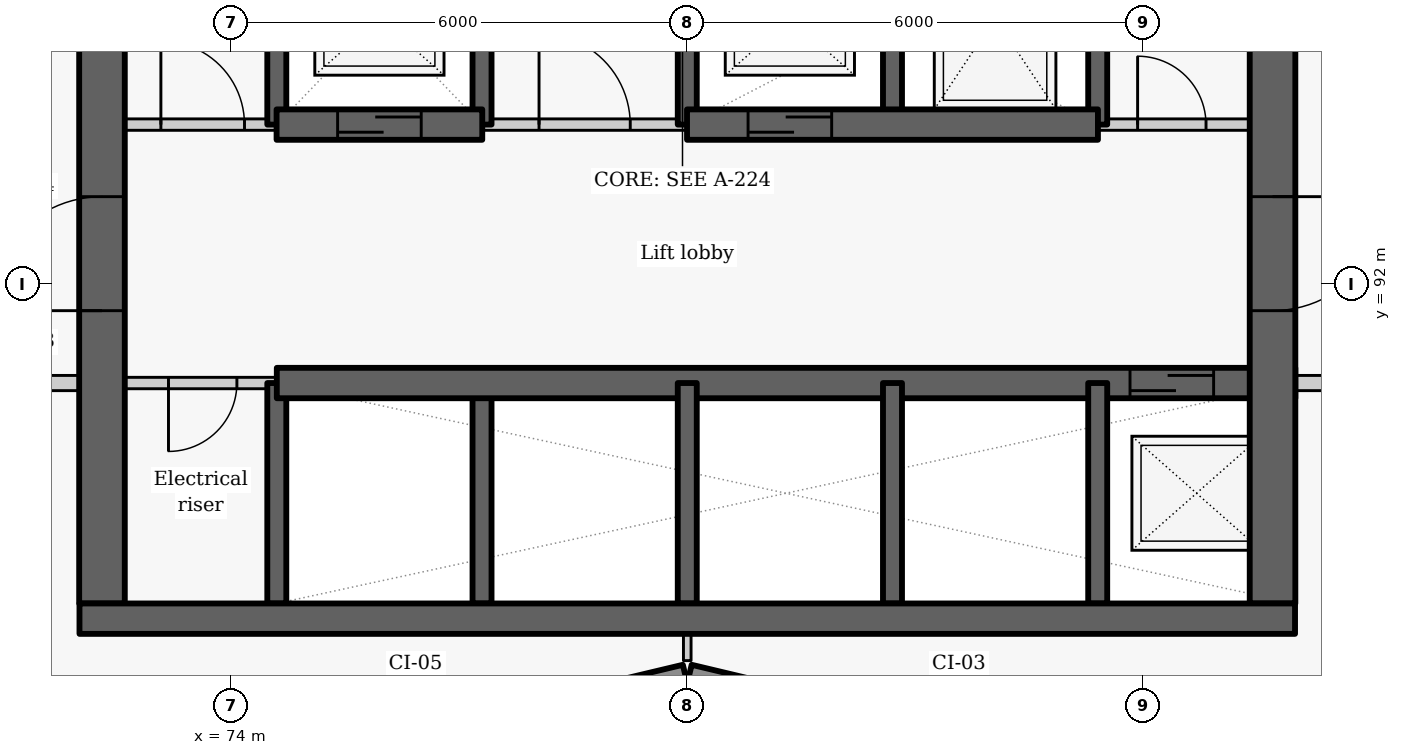
"""IFC4 building model, lengths in metres.
Left out: names, types, materials, properties, quantities, classifications, styles, units other than length and angle.
Written with IfcOpenShell. Run it as: python <this file> out.ifc"""

import sys

from ifc_helpers import new_model, si_unit, direction, frame, frame_2d, origin, place, context, subcontext, project, spatial, rectangle, extrude, element, fill, save


model = new_model("IFC4")
c1 = context("Model", 3, precision=1e-05, world=origin(), true_north=direction((0.0, 1.0)))
c2 = subcontext(c1, "Body", "Model", "MODEL_VIEW")
j1 = project(units=[si_unit("LENGTHUNIT", "METRE"), si_unit("PLANEANGLEUNIT", "RADIAN")], contexts=[c1])
p1 = place(None, origin())
s1 = spatial("IfcSite", under=j1, at=p1, CompositionType="ELEMENT")
p2 = place(p1, origin())
s2 = spatial("IfcBuilding", under=s1, at=p2, CompositionType="ELEMENT")
p3 = place(p2, frame((0.0, 0.0, 127.2)))
s3 = spatial("IfcBuildingStorey", under=s2, at=p3, CompositionType="ELEMENT", Elevation=127.2)
p4 = place(p3, frame((76.814, 86.119, 0.0), z_axis=(0.0, 0.0, 1.0), x_axis=(0.972773113459, 0.231759508395, 0.0)))
e1 = element("IfcWall", 1, at=p4, inside=s3, PredefinedType="SOLIDWALL", context=c2, shape_type="SweptSolid", body=[
    extrude(rectangle(XDim=3.246, YDim=0.25, at=frame_2d((1.623, 0.0))), origin(), (0.0, 0.0, 1.0), 2.425),
])
p5 = place(p4, frame((0.573, 0.0, 0.9)))
e2 = element("IfcOpeningElement", 2, at=p5, cuts=e1, PredefinedType="OPENING", context=c2, shape_type="SweptSolid", body=[
    extrude(rectangle(XDim=2.1, YDim=1.1, at=frame_2d((1.05, 0.55))), frame((0.0, 0.135, 0.0), z_axis=(0.0, -1.0, 0.0), x_axis=(1.0, 0.0, 0.0)), (0.0, 0.0, 1.0), 0.27),
])
p6 = place(p3, frame((80.029, 86.872, 0.0), z_axis=(0.0, 0.0, 1.0), x_axis=(0.972773113459, -0.231759508395, 0.0)))
e3 = element("IfcWall", 3, at=p6, inside=s3, PredefinedType="SOLIDWALL", context=c2, shape_type="SweptSolid", body=[
    extrude(rectangle(XDim=3.246, YDim=0.25, at=frame_2d((1.623, 0.0))), origin(), (0.0, 0.0, 1.0), 2.425),
])
p7 = place(p6, frame((0.573, 0.0, 0.9)))
e4 = element("IfcOpeningElement", 4, at=p7, cuts=e3, PredefinedType="OPENING", context=c2, shape_type="SweptSolid", body=[
    extrude(rectangle(XDim=2.1, YDim=1.1, at=frame_2d((1.05, 0.55))), frame((0.0, 0.135, 0.0), z_axis=(0.0, -1.0, 0.0), x_axis=(1.0, 0.0, 0.0)), (0.0, 0.0, 1.0), 0.27),
])
p8 = place(p3, frame((74.6, 87.8, -0.41), z_axis=(0.0, 0.0, 1.0), x_axis=(0.0, 1.0, 0.0)))
e5 = element("IfcWall", 5, at=p8, inside=s3, PredefinedType="SHEAR", context=c2, shape_type="SweptSolid", body=[
    extrude(rectangle(XDim=2.9, YDim=0.25, at=frame_2d((1.45, 0.0))), origin(), (0.0, 0.0, 1.0), 3.435),
])
p9 = place(p3, frame((74.6, 94.1, -0.41), z_axis=(0.0, 0.0, 1.0), x_axis=(0.0, 1.0, 0.0)))
e6 = element("IfcWall", 6, at=p9, inside=s3, PredefinedType="SHEAR", context=c2, shape_type="SweptSolid", body=[
    extrude(rectangle(XDim=2.8, YDim=0.25, at=frame_2d((1.4, 0.0))), origin(), (0.0, 0.0, 1.0), 3.435),
])
p10 = place(p3, frame((74.6, 90.7, 0.0), z_axis=(0.0, 0.0, 1.0), x_axis=(-1.0, 0.0, 0.0)))
e7 = element("IfcWall", 7, at=p10, inside=s3, PredefinedType="PARTITIONING", context=c2, shape_type="SweptSolid", body=[
    extrude(rectangle(XDim=2.6, YDim=0.15, at=frame_2d((1.3, 0.0))), origin(), (0.0, 0.0, 1.0), 3.025),
])
p11 = place(p10, frame((0.525, 0.0, 0.0)))
e8 = element("IfcOpeningElement", 8, at=p11, cuts=e7, PredefinedType="OPENING", context=c2, shape_type="SweptSolid", body=[
    extrude(rectangle(XDim=0.9, YDim=2.1, at=frame_2d((0.45, 1.05))), frame((0.0, 0.085, 0.0), z_axis=(0.0, -1.0, 0.0), x_axis=(1.0, 0.0, 0.0)), (0.0, 0.0, 1.0), 0.17),
])
p12 = place(p3, frame((72.3, 87.8, -0.41), z_axis=(0.0, 0.0, 1.0), x_axis=(0.0, 1.0, 0.0)))
e9 = element("IfcWall", 9, at=p12, inside=s3, PredefinedType="SHEAR", context=c2, shape_type="SweptSolid", body=[
    extrude(rectangle(XDim=9.1, YDim=0.6, at=frame_2d((4.55, 0.0))), origin(), (0.0, 0.0, 1.0), 3.435),
])
p13 = place(p12, frame((3.852, 0.0, 0.41)))
e10 = element("IfcOpeningElement", 10, at=p13, cuts=e9, PredefinedType="OPENING", context=c2, shape_type="SweptSolid", body=[
    extrude(rectangle(XDim=1.5, YDim=2.1, at=frame_2d((0.75, 1.05))), frame((0.0, 0.31, 0.0), z_axis=(0.0, -1.0, 0.0), x_axis=(1.0, 0.0, 0.0)), (0.0, 0.0, 1.0), 0.62),
])
p14 = place(p3, frame((77.3, 87.8, -0.41), z_axis=(0.0, 0.0, 1.0), x_axis=(0.0, 1.0, 0.0)))
e11 = element("IfcWall", 11, at=p14, inside=s3, PredefinedType="SHEAR", context=c2, shape_type="SweptSolid", body=[
    extrude(rectangle(XDim=2.9, YDim=0.25, at=frame_2d((1.45, 0.0))), origin(), (0.0, 0.0, 1.0), 3.435),
])
p15 = place(p3, frame((77.3, 94.1, -0.41), z_axis=(0.0, 0.0, 1.0), x_axis=(0.0, 1.0, 0.0)))
e12 = element("IfcWall", 12, at=p15, inside=s3, PredefinedType="SHEAR", context=c2, shape_type="SweptSolid", body=[
    extrude(rectangle(XDim=2.8, YDim=0.25, at=frame_2d((1.4, 0.0))), origin(), (0.0, 0.0, 1.0), 3.435),
])
p16 = place(p3, frame((74.6, 90.7, -0.41), z_axis=(0.0, 0.0, 1.0), x_axis=(1.0, 0.0, 0.0)))
e13 = element("IfcWall", 13, at=p16, inside=s3, PredefinedType="SHEAR", context=c2, shape_type="SweptSolid", body=[
    extrude(rectangle(XDim=13.4, YDim=0.4, at=frame_2d((6.7, 0.0))), origin(), (0.0, 0.0, 1.0), 3.435),
])
p17 = place(p16, frame((11.225, 0.0, 0.41)))
e14 = element("IfcOpeningElement", 14, at=p17, cuts=e13, PredefinedType="OPENING", context=c2, shape_type="SweptSolid", body=[
    extrude(rectangle(XDim=1.1, YDim=2.1, at=frame_2d((0.55, 1.05))), frame((0.0, 0.21, 0.0), z_axis=(0.0, -1.0, 0.0), x_axis=(1.0, 0.0, 0.0)), (0.0, 0.0, 1.0), 0.42),
])
p18 = place(p3, frame((80.0, 87.8, -0.41), z_axis=(0.0, 0.0, 1.0), x_axis=(0.0, 1.0, 0.0)))
e15 = element("IfcWall", 15, at=p18, inside=s3, PredefinedType="SHEAR", context=c2, shape_type="SweptSolid", body=[
    extrude(rectangle(XDim=2.9, YDim=0.25, at=frame_2d((1.45, 0.0))), origin(), (0.0, 0.0, 1.0), 3.435),
])
p19 = place(p3, frame((80.0, 94.1, -0.41), z_axis=(0.0, 0.0, 1.0), x_axis=(0.0, 1.0, 0.0)))
e16 = element("IfcWall", 16, at=p19, inside=s3, PredefinedType="SHEAR", context=c2, shape_type="SweptSolid", body=[
    extrude(rectangle(XDim=2.8, YDim=0.25, at=frame_2d((1.4, 0.0))), origin(), (0.0, 0.0, 1.0), 3.435),
])
p20 = place(p3, frame((82.7, 87.8, -0.41), z_axis=(0.0, 0.0, 1.0), x_axis=(0.0, 1.0, 0.0)))
e17 = element("IfcWall", 17, at=p20, inside=s3, PredefinedType="SHEAR", context=c2, shape_type="SweptSolid", body=[
    extrude(rectangle(XDim=2.9, YDim=0.25, at=frame_2d((1.45, 0.0))), origin(), (0.0, 0.0, 1.0), 3.435),
])
p21 = place(p3, frame((82.7, 94.1, -0.41), z_axis=(0.0, 0.0, 1.0), x_axis=(0.0, 1.0, 0.0)))
e18 = element("IfcWall", 18, at=p21, inside=s3, PredefinedType="SHEAR", context=c2, shape_type="SweptSolid", body=[
    extrude(rectangle(XDim=2.8, YDim=0.25, at=frame_2d((1.4, 0.0))), origin(), (0.0, 0.0, 1.0), 3.435),
])
p22 = place(p3, frame((85.4, 87.8, -0.41), z_axis=(0.0, 0.0, 1.0), x_axis=(0.0, 1.0, 0.0)))
e19 = element("IfcWall", 19, at=p22, inside=s3, PredefinedType="SHEAR", context=c2, shape_type="SweptSolid", body=[
    extrude(rectangle(XDim=2.9, YDim=0.25, at=frame_2d((1.45, 0.0))), origin(), (0.0, 0.0, 1.0), 3.435),
])
p23 = place(p3, frame((85.4, 94.1, -0.41), z_axis=(0.0, 0.0, 1.0), x_axis=(0.0, 1.0, 0.0)))
e20 = element("IfcWall", 20, at=p23, inside=s3, PredefinedType="SHEAR", context=c2, shape_type="SweptSolid", body=[
    extrude(rectangle(XDim=2.8, YDim=0.25, at=frame_2d((1.4, 0.0))), origin(), (0.0, 0.0, 1.0), 3.435),
])
p24 = place(p3, frame((87.7, 103.4, -0.41), z_axis=(0.0, 0.0, 1.0), x_axis=(0.0, -1.0, 0.0)))
e21 = element("IfcWall", 21, at=p24, inside=s3, PredefinedType="SHEAR", context=c2, shape_type="SweptSolid", body=[
    extrude(rectangle(XDim=15.6, YDim=0.6, at=frame_2d((7.8, 0.0))), origin(), (0.0, 0.0, 1.0), 3.435),
])
p25 = place(p24, frame((10.248, 0.0, 0.41)))
e22 = element("IfcOpeningElement", 22, at=p25, cuts=e21, PredefinedType="OPENING", context=c2, shape_type="SweptSolid", body=[
    extrude(rectangle(XDim=1.5, YDim=2.1, at=frame_2d((0.75, 1.05))), frame((0.0, 0.31, 0.0), z_axis=(0.0, -1.0, 0.0), x_axis=(1.0, 0.0, 0.0)), (0.0, 0.0, 1.0), 0.62),
])
p26 = place(p3, frame((72.0, 94.1, 0.0), z_axis=(0.0, 0.0, 1.0), x_axis=(1.0, 0.0, 0.0)))
e23 = element("IfcWall", 23, at=p26, inside=s3, PredefinedType="PARTITIONING", context=c2, shape_type="SweptSolid", body=[
    extrude(rectangle(XDim=2.603, YDim=0.15, at=frame_2d((1.302, 0.0))), origin(), (0.0, 0.0, 1.0), 3.025),
])
p27 = place(p26, frame((1.075, 0.0, 0.0)))
e24 = element("IfcOpeningElement", 24, at=p27, cuts=e23, PredefinedType="OPENING", context=c2, shape_type="SweptSolid", body=[
    extrude(rectangle(XDim=1.1, YDim=2.1, at=frame_2d((0.55, 1.05))), frame((0.0, 0.085, 0.0), z_axis=(0.0, -1.0, 0.0), x_axis=(1.0, 0.0, 0.0)), (0.0, 0.0, 1.0), 0.17),
])
p28 = place(p3, frame((77.297, 94.1, 0.0), z_axis=(0.0, 0.0, 1.0), x_axis=(1.0, 0.0, 0.0)))
e25 = element("IfcWall", 25, at=p28, inside=s3, PredefinedType="PARTITIONING", context=c2, shape_type="SweptSolid", body=[
    extrude(rectangle(XDim=2.706, YDim=0.15, at=frame_2d((1.353, 0.0))), origin(), (0.0, 0.0, 1.0), 3.025),
])
p29 = place(p28, frame((0.753, 0.0, 0.0)))
e26 = element("IfcOpeningElement", 26, at=p29, cuts=e25, PredefinedType="OPENING", context=c2, shape_type="SweptSolid", body=[
    extrude(rectangle(XDim=1.2, YDim=2.1, at=frame_2d((0.6, 1.05))), frame((0.0, 0.085, 0.0), z_axis=(0.0, -1.0, 0.0), x_axis=(1.0, 0.0, 0.0)), (0.0, 0.0, 1.0), 0.17),
])
p30 = place(p3, frame((85.397, 94.1, 0.0), z_axis=(0.0, 0.0, 1.0), x_axis=(1.0, 0.0, 0.0)))
e27 = element("IfcWall", 27, at=p30, inside=s3, PredefinedType="PARTITIONING", context=c2, shape_type="SweptSolid", body=[
    extrude(rectangle(XDim=2.603, YDim=0.15, at=frame_2d((1.302, 0.0))), origin(), (0.0, 0.0, 1.0), 3.025),
])
p31 = place(p30, frame((0.528, 0.0, 0.0)))
e28 = element("IfcOpeningElement", 28, at=p31, cuts=e27, PredefinedType="OPENING", context=c2, shape_type="SweptSolid", body=[
    extrude(rectangle(XDim=0.9, YDim=2.1, at=frame_2d((0.45, 1.05))), frame((0.0, 0.085, 0.0), z_axis=(0.0, -1.0, 0.0), x_axis=(1.0, 0.0, 0.0)), (0.0, 0.0, 1.0), 0.17),
])
p32 = place(p3, frame((74.597, 94.1, -0.41), z_axis=(0.0, 0.0, 1.0), x_axis=(1.0, 0.0, 0.0)))
e29 = element("IfcWall", 29, at=p32, inside=s3, PredefinedType="SHEAR", context=c2, shape_type="SweptSolid", body=[
    extrude(rectangle(XDim=2.706, YDim=0.4, at=frame_2d((1.353, 0.0))), origin(), (0.0, 0.0, 1.0), 3.435),
])
p33 = place(p32, frame((0.803, 0.0, 0.41)))
e30 = element("IfcOpeningElement", 30, at=p33, cuts=e29, PredefinedType="OPENING", context=c2, shape_type="SweptSolid", body=[
    extrude(rectangle(XDim=1.1, YDim=2.1, at=frame_2d((0.55, 1.05))), frame((0.0, 0.21, 0.0), z_axis=(0.0, -1.0, 0.0), x_axis=(1.0, 0.0, 0.0)), (0.0, 0.0, 1.0), 0.42),
])
p34 = place(p3, frame((79.997, 94.1, -0.41), z_axis=(0.0, 0.0, 1.0), x_axis=(1.0, 0.0, 0.0)))
e31 = element("IfcWall", 31, at=p34, inside=s3, PredefinedType="SHEAR", context=c2, shape_type="SweptSolid", body=[
    extrude(rectangle(XDim=5.406, YDim=0.4, at=frame_2d((2.703, 0.0))), origin(), (0.0, 0.0, 1.0), 3.435),
])
p35 = place(p34, frame((0.803, 0.0, 0.41)))
e32 = element("IfcOpeningElement", 32, at=p35, cuts=e31, PredefinedType="OPENING", context=c2, shape_type="SweptSolid", body=[
    extrude(rectangle(XDim=1.1, YDim=2.1, at=frame_2d((0.55, 1.05))), frame((0.0, 0.21, 0.0), z_axis=(0.0, -1.0, 0.0), x_axis=(1.0, 0.0, 0.0)), (0.0, 0.0, 1.0), 0.42),
])
for number, where, z_axis, x_axis in (
    (33, (70.45, 90.7, 0.0), (0.0, 0.0, 1.0), (1.0, 0.0, 0.0)),
    (34, (88.0, 90.7, 0.0), (0.0, 0.0, 1.0), (1.0, 0.0, 0.0)),
):
    element("IfcWall", number, at=place(p3, frame(where, z_axis=z_axis, x_axis=x_axis)), inside=s3, PredefinedType="PARTITIONING", context=c2, shape_type="SweptSolid", body=[
        extrude(rectangle(XDim=1.55, YDim=0.2, at=frame_2d((0.775, 0.0))), origin(), (0.0, 0.0, 1.0), 3.025),
    ])
p36 = place(p3, frame((80.0, 87.048, 0.0), z_axis=(0.0, 0.0, 1.0), x_axis=(0.0, 1.0, 0.0)))
e35 = element("IfcWall", 35, at=p36, inside=s3, PredefinedType="PARTITIONING", context=c2, shape_type="SweptSolid", body=[
    extrude(rectangle(XDim=0.352, YDim=0.1, at=frame_2d((0.176, 0.0))), origin(), (0.0, 0.0, 1.0), 3.025),
])
p37 = place(p3, frame((72.004, 87.6, -0.41), z_axis=(0.0, 0.0, 1.0), x_axis=(1.0, 0.0, 0.0)))
e36 = element("IfcWall", 36, at=p37, inside=s3, PredefinedType="SHEAR", context=c2, shape_type="SweptSolid", body=[
    extrude(rectangle(XDim=15.992, YDim=0.4, at=frame_2d((7.996, 0.0))), origin(), (0.0, 0.0, 1.0), 3.435),
])
p38 = place(p11, origin())
e37 = element("IfcDoor", 37, at=p38, inside=s3, OperationType="SINGLE_SWING_RIGHT", PredefinedType="DOOR", context=c2, shape_type="SweptSolid", body=[
    extrude(rectangle(XDim=0.9, YDim=2.1, at=frame_2d((0.45, 1.05))), frame((0.0, 0.025, 0.0), z_axis=(0.0, -1.0, 0.0), x_axis=(1.0, 0.0, 0.0)), (0.0, 0.0, 1.0), 0.05),
])
fill(e8, e37)
p39 = place(p17, origin())
e38 = element("IfcDoor", 38, at=p39, inside=s3, OperationType="SLIDING_TO_LEFT", PredefinedType="DOOR", context=c2, shape_type="SweptSolid", body=[
    extrude(rectangle(XDim=1.1, YDim=2.1, at=frame_2d((0.55, 1.05))), frame((0.0, 0.025, 0.0), z_axis=(0.0, -1.0, 0.0), x_axis=(1.0, 0.0, 0.0)), (0.0, 0.0, 1.0), 0.05),
])
fill(e14, e38)
p40 = place(p27, origin())
e39 = element("IfcDoor", 39, at=p40, inside=s3, OperationType="SINGLE_SWING_LEFT", PredefinedType="DOOR", context=c2, shape_type="SweptSolid", body=[
    extrude(rectangle(XDim=1.1, YDim=2.1, at=frame_2d((0.55, 1.05))), frame((0.0, 0.025, 0.0), z_axis=(0.0, -1.0, 0.0), x_axis=(1.0, 0.0, 0.0)), (0.0, 0.0, 1.0), 0.05),
])
fill(e24, e39)
p41 = place(p33, origin())
e40 = element("IfcDoor", 40, at=p41, inside=s3, OperationType="SLIDING_TO_LEFT", PredefinedType="DOOR", context=c2, shape_type="SweptSolid", body=[
    extrude(rectangle(XDim=1.1, YDim=2.1, at=frame_2d((0.55, 1.05))), frame((0.0, 0.025, 0.0), z_axis=(0.0, -1.0, 0.0), x_axis=(1.0, 0.0, 0.0)), (0.0, 0.0, 1.0), 0.05),
])
fill(e30, e40)
p42 = place(p29, origin())
e41 = element("IfcDoor", 41, at=p42, inside=s3, OperationType="DOUBLE_DOOR_SINGLE_SWING", PredefinedType="DOOR", context=c2, shape_type="SweptSolid", body=[
    extrude(rectangle(XDim=1.2, YDim=2.1, at=frame_2d((0.6, 1.05))), frame((0.0, 0.025, 0.0), z_axis=(0.0, -1.0, 0.0), x_axis=(1.0, 0.0, 0.0)), (0.0, 0.0, 1.0), 0.05),
])
fill(e26, e41)
p43 = place(p35, origin())
e42 = element("IfcDoor", 42, at=p43, inside=s3, OperationType="SLIDING_TO_LEFT", PredefinedType="DOOR", context=c2, shape_type="SweptSolid", body=[
    extrude(rectangle(XDim=1.1, YDim=2.1, at=frame_2d((0.55, 1.05))), frame((0.0, 0.025, 0.0), z_axis=(0.0, -1.0, 0.0), x_axis=(1.0, 0.0, 0.0)), (0.0, 0.0, 1.0), 0.05),
])
fill(e32, e42)
p44 = place(p31, origin())
e43 = element("IfcDoor", 43, at=p44, inside=s3, OperationType="SINGLE_SWING_LEFT", PredefinedType="DOOR", context=c2, shape_type="SweptSolid", body=[
    extrude(rectangle(XDim=0.9, YDim=2.1, at=frame_2d((0.45, 1.05))), frame((0.0, 0.025, 0.0), z_axis=(0.0, -1.0, 0.0), x_axis=(1.0, 0.0, 0.0)), (0.0, 0.0, 1.0), 0.05),
])
fill(e28, e43)
p45 = place(p25, origin())
e44 = element("IfcDoor", 44, at=p45, inside=s3, OperationType="DOUBLE_DOOR_SINGLE_SWING", PredefinedType="DOOR", context=c2, shape_type="SweptSolid", body=[
    extrude(rectangle(XDim=1.5, YDim=2.1, at=frame_2d((0.75, 1.05))), frame((0.0, 0.025, 0.0), z_axis=(0.0, -1.0, 0.0), x_axis=(1.0, 0.0, 0.0)), (0.0, 0.0, 1.0), 0.05),
])
fill(e22, e44)
p46 = place(p13, origin())
e45 = element("IfcDoor", 45, at=p46, inside=s3, OperationType="DOUBLE_DOOR_SINGLE_SWING", PredefinedType="DOOR", context=c2, shape_type="SweptSolid", body=[
    extrude(rectangle(XDim=1.5, YDim=2.1, at=frame_2d((0.75, 1.05))), frame((0.0, 0.025, 0.0), z_axis=(0.0, -1.0, 0.0), x_axis=(1.0, 0.0, 0.0)), (0.0, 0.0, 1.0), 0.05),
])
fill(e10, e45)
save(model, sys.argv[1])
